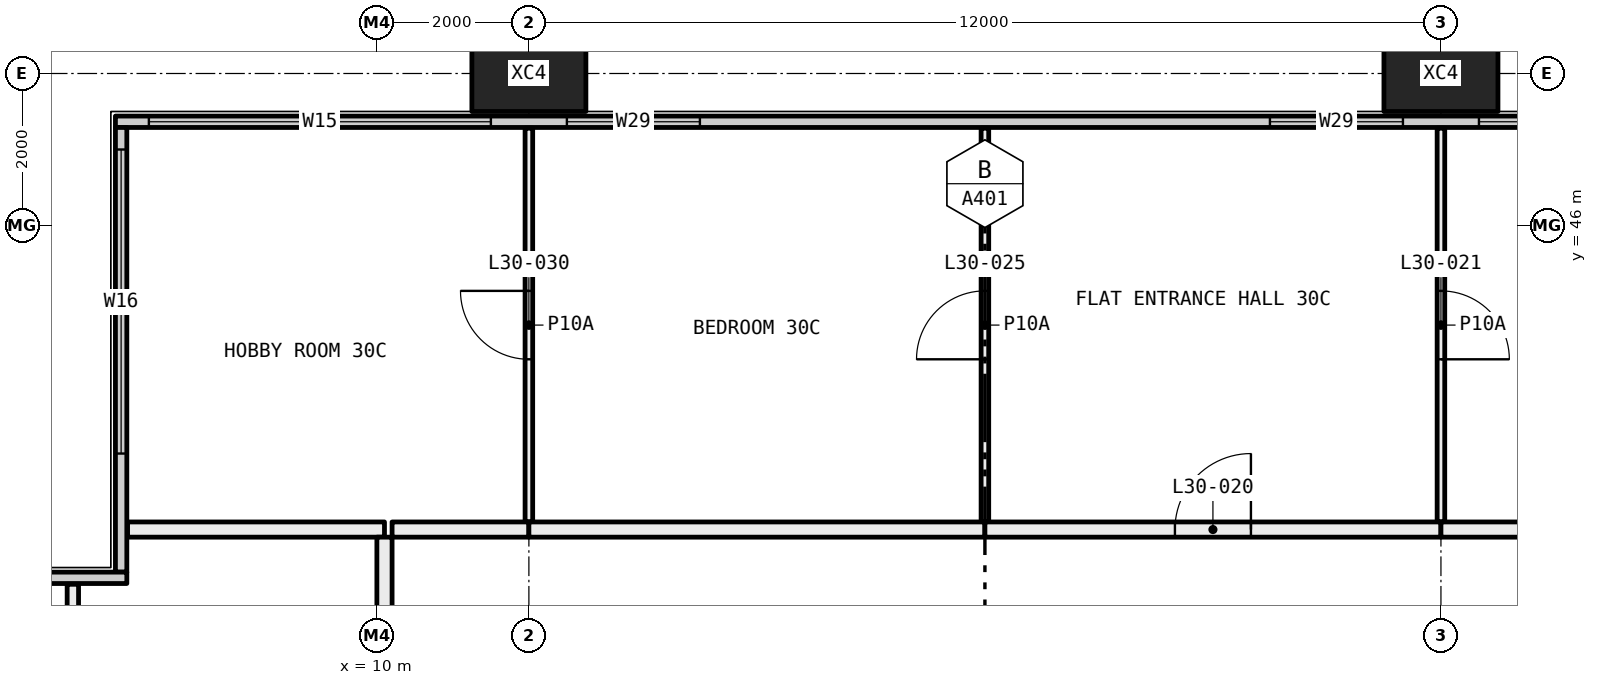
"""IFC4 building model, lengths in metres.
Left out: names, types, materials, properties, quantities, classifications, styles, units other than length and angle.
Written with IfcOpenShell. Run it as: python <this file> out.ifc"""

import sys

from ifc_helpers import new_model, si_unit, direction, frame, frame_2d, origin, origin_2d, place, context, subcontext, project, spatial, rectangle, hollow_rectangle, extrude, element, fill, save


model = new_model("IFC4")
c1 = context("Model", 3, precision=1e-05, world=origin(), true_north=direction((0.0, 1.0)))
c2 = subcontext(c1, "Body", "Model", "MODEL_VIEW")
j1 = project(units=[si_unit("LENGTHUNIT", "METRE"), si_unit("PLANEANGLEUNIT", "RADIAN")], contexts=[c1])
p1 = place(None, origin())
s1 = spatial("IfcSite", under=j1, at=p1, CompositionType="ELEMENT")
p2 = place(p1, origin())
s2 = spatial("IfcBuilding", under=s1, at=p2, CompositionType="ELEMENT")
p3 = place(p2, frame((0.0, 0.0, 117.3)))
s3 = spatial("IfcBuildingStorey", under=s2, at=p3, CompositionType="ELEMENT", Elevation=117.3)
for number, where, z_axis, x_axis in (
    (1, (12.0, 48.0, -0.4), (0.0, 0.0, 1.0), (1.0, 0.0, 0.0)),
    (2, (24.0, 48.0, -0.4), (0.0, 0.0, 1.0), (1.0, 0.0, 0.0)),
):
    element("IfcColumn", number, at=place(p3, frame(where, z_axis=z_axis, x_axis=x_axis)), inside=s3, PredefinedType="COLUMN", context=c2, shape_type="SweptSolid", body=[
        extrude(hollow_rectangle(XDim=1.5, YDim=1.0, WallThickness=0.06, at=origin_2d()), origin(), (0.0, 0.0, 1.0), 3.45),
    ])
p4 = place(p3, frame((6.56, 47.365, 0.0), z_axis=(0.0, 0.0, 1.0), x_axis=(1.0, 0.0, 0.0)))
e3 = element("IfcWall", 3, at=p4, inside=s3, PredefinedType="ELEMENTEDWALL", context=c2, shape_type="SweptSolid", body=[
    extrude(rectangle(XDim=58.88, YDim=0.15, at=frame_2d((29.44, 0.0))), origin(), (0.0, 0.0, 1.0), 3.05),
])
p5 = place(p4, frame((0.44, 0.0, 0.45)))
e4 = element("IfcOpeningElement", 4, at=p5, cuts=e3, PredefinedType="OPENING", context=c2, shape_type="SweptSolid", body=[
    extrude(rectangle(XDim=4.5, YDim=2.55, at=frame_2d((2.25, 1.275))), frame((0.0, 0.085, 0.0), z_axis=(0.0, -1.0, 0.0), x_axis=(1.0, 0.0, 0.0)), (0.0, 0.0, 1.0), 0.17),
])
p6 = place(p4, frame((5.94, 0.0, 0.45)))
e5 = element("IfcOpeningElement", 5, at=p6, cuts=e3, PredefinedType="OPENING", context=c2, shape_type="SweptSolid", body=[
    extrude(rectangle(XDim=1.75, YDim=2.55, at=frame_2d((0.875, 1.275))), frame((0.0, 0.085, 0.0), z_axis=(0.0, -1.0, 0.0), x_axis=(1.0, 0.0, 0.0)), (0.0, 0.0, 1.0), 0.17),
])
p7 = place(p4, frame((15.19, 0.0, 0.45)))
e6 = element("IfcOpeningElement", 6, at=p7, cuts=e3, PredefinedType="OPENING", context=c2, shape_type="SweptSolid", body=[
    extrude(rectangle(XDim=1.75, YDim=2.55, at=frame_2d((0.875, 1.275))), frame((0.0, 0.085, 0.0), z_axis=(0.0, -1.0, 0.0), x_axis=(1.0, 0.0, 0.0)), (0.0, 0.0, 1.0), 0.17),
])
p8 = place(p4, frame((17.94, 0.0, 0.45)))
e7 = element("IfcOpeningElement", 7, at=p8, cuts=e3, PredefinedType="OPENING", context=c2, shape_type="SweptSolid", body=[
    extrude(rectangle(XDim=1.75, YDim=2.55, at=frame_2d((0.875, 1.275))), frame((0.0, 0.085, 0.0), z_axis=(0.0, -1.0, 0.0), x_axis=(1.0, 0.0, 0.0)), (0.0, 0.0, 1.0), 0.17),
])
p9 = place(p4, frame((27.19, 0.0, 0.45)))
e8 = element("IfcOpeningElement", 8, at=p9, cuts=e3, PredefinedType="OPENING", context=c2, shape_type="SweptSolid", body=[
    extrude(rectangle(XDim=1.75, YDim=2.55, at=frame_2d((0.875, 1.275))), frame((0.0, 0.085, 0.0), z_axis=(0.0, -1.0, 0.0), x_axis=(1.0, 0.0, 0.0)), (0.0, 0.0, 1.0), 0.17),
])
p10 = place(p4, frame((29.94, 0.0, 0.45)))
e9 = element("IfcOpeningElement", 9, at=p10, cuts=e3, PredefinedType="OPENING", context=c2, shape_type="SweptSolid", body=[
    extrude(rectangle(XDim=1.75, YDim=2.55, at=frame_2d((0.875, 1.275))), frame((0.0, 0.085, 0.0), z_axis=(0.0, -1.0, 0.0), x_axis=(1.0, 0.0, 0.0)), (0.0, 0.0, 1.0), 0.17),
])
p11 = place(p4, frame((39.19, 0.0, 0.45)))
e10 = element("IfcOpeningElement", 10, at=p11, cuts=e3, PredefinedType="OPENING", context=c2, shape_type="SweptSolid", body=[
    extrude(rectangle(XDim=1.75, YDim=2.55, at=frame_2d((0.875, 1.275))), frame((0.0, 0.085, 0.0), z_axis=(0.0, -1.0, 0.0), x_axis=(1.0, 0.0, 0.0)), (0.0, 0.0, 1.0), 0.17),
])
p12 = place(p4, frame((41.94, 0.0, 0.45)))
e11 = element("IfcOpeningElement", 11, at=p12, cuts=e3, PredefinedType="OPENING", context=c2, shape_type="SweptSolid", body=[
    extrude(rectangle(XDim=1.75, YDim=2.55, at=frame_2d((0.875, 1.275))), frame((0.0, 0.085, 0.0), z_axis=(0.0, -1.0, 0.0), x_axis=(1.0, 0.0, 0.0)), (0.0, 0.0, 1.0), 0.17),
])
p13 = place(p4, frame((51.19, 0.0, 0.45)))
e12 = element("IfcOpeningElement", 12, at=p13, cuts=e3, PredefinedType="OPENING", context=c2, shape_type="SweptSolid", body=[
    extrude(rectangle(XDim=1.75, YDim=2.55, at=frame_2d((0.875, 1.275))), frame((0.0, 0.085, 0.0), z_axis=(0.0, -1.0, 0.0), x_axis=(1.0, 0.0, 0.0)), (0.0, 0.0, 1.0), 0.17),
])
p14 = place(p4, frame((53.94, 0.0, 0.45)))
e13 = element("IfcOpeningElement", 13, at=p14, cuts=e3, PredefinedType="OPENING", context=c2, shape_type="SweptSolid", body=[
    extrude(rectangle(XDim=4.5, YDim=2.55, at=frame_2d((2.25, 1.275))), frame((0.0, 0.085, 0.0), z_axis=(0.0, -1.0, 0.0), x_axis=(1.0, 0.0, 0.0)), (0.0, 0.0, 1.0), 0.17),
])
p15 = place(p3, frame((6.635, 41.44, 0.0), z_axis=(0.0, 0.0, 1.0), x_axis=(0.0, 1.0, 0.0)))
e14 = element("IfcWall", 14, at=p15, inside=s3, PredefinedType="ELEMENTEDWALL", context=c2, shape_type="SweptSolid", body=[
    extrude(rectangle(XDim=5.85, YDim=0.15, at=frame_2d((2.925, 0.0))), origin(), (0.0, 0.0, 1.0), 3.05),
])
p16 = place(p15, frame((1.56, 0.0, 0.45)))
e15 = element("IfcOpeningElement", 15, at=p16, cuts=e14, PredefinedType="OPENING", context=c2, shape_type="SweptSolid", body=[
    extrude(rectangle(XDim=4.0, YDim=2.55, at=frame_2d((2.0, 1.275))), frame((0.0, 0.085, 0.0), z_axis=(0.0, -1.0, 0.0), x_axis=(1.0, 0.0, 0.0)), (0.0, 0.0, 1.0), 0.17),
])
p17 = place(p3, frame((0.56, 41.365, 0.0), z_axis=(0.0, 0.0, 1.0), x_axis=(1.0, 0.0, 0.0)))
e16 = element("IfcWall", 16, at=p17, inside=s3, PredefinedType="ELEMENTEDWALL", context=c2, shape_type="SweptSolid", body=[
    extrude(rectangle(XDim=6.15, YDim=0.15, at=frame_2d((3.075, 0.0))), origin(), (0.0, 0.0, 1.0), 3.05),
])
p18 = place(p17, frame((0.44, 0.0, 0.45)))
e17 = element("IfcOpeningElement", 17, at=p18, cuts=e16, PredefinedType="OPENING", context=c2, shape_type="SweptSolid", body=[
    extrude(rectangle(XDim=4.0, YDim=2.55, at=frame_2d((2.0, 1.275))), frame((0.0, 0.085, 0.0), z_axis=(0.0, -1.0, 0.0), x_axis=(1.0, 0.0, 0.0)), (0.0, 0.0, 1.0), 0.17),
])
p19 = place(p3, frame((6.0, 37.5, 0.0), z_axis=(0.0, 0.0, 1.0), x_axis=(0.0, 1.0, 0.0)))
e18 = element("IfcWall", 18, at=p19, inside=s3, PredefinedType="PARTITIONING", context=c2, shape_type="SweptSolid", body=[
    extrude(rectangle(XDim=3.78, YDim=0.15, at=frame_2d((1.89, 0.0))), origin(), (0.0, 0.0, 1.0), 3.05),
])
p20 = place(p3, frame((10.1, 42.0, 0.0), z_axis=(0.0, 0.0, 1.0), x_axis=(-1.0, 0.0, 0.0)))
e19 = element("IfcWall", 19, at=p20, inside=s3, PredefinedType="PARTITIONING", context=c2, shape_type="SweptSolid", body=[
    extrude(rectangle(XDim=3.38, YDim=0.2, at=frame_2d((1.69, 0.0))), origin(), (0.0, 0.0, 1.0), 3.05),
])
p21 = place(p3, frame((10.1, 37.5, 0.0), z_axis=(0.0, 0.0, 1.0), x_axis=(0.0, 1.0, 0.0)))
e20 = element("IfcWall", 20, at=p21, inside=s3, PredefinedType="PARTITIONING", context=c2, shape_type="SweptSolid", body=[
    extrude(rectangle(XDim=4.4, YDim=0.2, at=frame_2d((2.2, 0.0))), origin(), (0.0, 0.0, 1.0), 3.05),
])
p22 = place(p3, frame((12.0, 42.1, 0.0), z_axis=(0.0, 0.0, 1.0), x_axis=(0.0, 1.0, 0.0)))
e21 = element("IfcWall", 21, at=p22, inside=s3, PredefinedType="PARTITIONING", context=c2, shape_type="SweptSolid", body=[
    extrude(rectangle(XDim=5.18, YDim=0.1, at=frame_2d((2.59, 0.0))), origin(), (0.0, 0.0, 1.0), 3.05),
])
p23 = place(p22, frame((2.14, 0.0, 0.0)))
e22 = element("IfcOpeningElement", 22, at=p23, cuts=e21, PredefinedType="OPENING", context=c2, shape_type="SweptSolid", body=[
    extrude(rectangle(XDim=0.9, YDim=2.1, at=frame_2d((0.45, 1.05))), frame((0.0, 0.06, 0.0), z_axis=(0.0, -1.0, 0.0), x_axis=(1.0, 0.0, 0.0)), (0.0, 0.0, 1.0), 0.12),
])
p24 = place(p3, frame((10.2, 42.0, 0.0), z_axis=(0.0, 0.0, 1.0), x_axis=(1.0, 0.0, 0.0)))
e23 = element("IfcWall", 23, at=p24, inside=s3, PredefinedType="PARTITIONING", context=c2, shape_type="SweptSolid", body=[
    extrude(rectangle(XDim=1.8, YDim=0.2, at=frame_2d((0.9, 0.0))), origin(), (0.0, 0.0, 1.0), 3.05),
])
p25 = place(p3, frame((18.0, 42.1, 0.0), z_axis=(0.0, 0.0, 1.0), x_axis=(0.0, 1.0, 0.0)))
e24 = element("IfcWall", 24, at=p25, inside=s3, PredefinedType="PARTITIONING", context=c2, shape_type="SweptSolid", body=[
    extrude(rectangle(XDim=5.18, YDim=0.1, at=frame_2d((2.59, 0.0))), origin(), (0.0, 0.0, 1.0), 3.05),
])
p26 = place(p25, frame((2.14, 0.0, 0.0)))
e25 = element("IfcOpeningElement", 25, at=p26, cuts=e24, PredefinedType="OPENING", context=c2, shape_type="SweptSolid", body=[
    extrude(rectangle(XDim=0.9, YDim=2.1, at=frame_2d((0.45, 1.05))), frame((0.0, 0.06, 0.0), z_axis=(0.0, -1.0, 0.0), x_axis=(1.0, 0.0, 0.0)), (0.0, 0.0, 1.0), 0.12),
])
p27 = place(p3, frame((12.0, 42.0, 0.0), z_axis=(0.0, 0.0, 1.0), x_axis=(1.0, 0.0, 0.0)))
e26 = element("IfcWall", 26, at=p27, inside=s3, PredefinedType="PARTITIONING", context=c2, shape_type="SweptSolid", body=[
    extrude(rectangle(XDim=6.0, YDim=0.2, at=frame_2d((3.0, 0.0))), origin(), (0.0, 0.0, 1.0), 3.05),
])
p28 = place(p3, frame((24.0, 42.1, 0.0), z_axis=(0.0, 0.0, 1.0), x_axis=(0.0, 1.0, 0.0)))
e27 = element("IfcWall", 27, at=p28, inside=s3, PredefinedType="PARTITIONING", context=c2, shape_type="SweptSolid", body=[
    extrude(rectangle(XDim=5.18, YDim=0.1, at=frame_2d((2.59, 0.0))), origin(), (0.0, 0.0, 1.0), 3.05),
])
p29 = place(p28, frame((2.14, 0.0, 0.0)))
e28 = element("IfcOpeningElement", 28, at=p29, cuts=e27, PredefinedType="OPENING", context=c2, shape_type="SweptSolid", body=[
    extrude(rectangle(XDim=0.9, YDim=2.1, at=frame_2d((0.45, 1.05))), frame((0.0, 0.06, 0.0), z_axis=(0.0, -1.0, 0.0), x_axis=(1.0, 0.0, 0.0)), (0.0, 0.0, 1.0), 0.12),
])
p30 = place(p3, frame((18.0, 42.0, 0.0), z_axis=(0.0, 0.0, 1.0), x_axis=(1.0, 0.0, 0.0)))
e29 = element("IfcWall", 29, at=p30, inside=s3, PredefinedType="PARTITIONING", context=c2, shape_type="SweptSolid", body=[
    extrude(rectangle(XDim=6.0, YDim=0.2, at=frame_2d((3.0, 0.0))), origin(), (0.0, 0.0, 1.0), 3.05),
])
p31 = place(p30, frame((2.5, 0.0, 0.0)))
e30 = element("IfcOpeningElement", 30, at=p31, cuts=e29, PredefinedType="OPENING", context=c2, shape_type="SweptSolid", body=[
    extrude(rectangle(XDim=1.0, YDim=2.1, at=frame_2d((0.5, 1.05))), frame((0.0, 0.11, 0.0), z_axis=(0.0, -1.0, 0.0), x_axis=(1.0, 0.0, 0.0)), (0.0, 0.0, 1.0), 0.22),
])
p32 = place(p3, frame((24.0, 42.0, 0.0), z_axis=(0.0, 0.0, 1.0), x_axis=(1.0, 0.0, 0.0)))
e31 = element("IfcWall", 31, at=p32, inside=s3, PredefinedType="PARTITIONING", context=c2, shape_type="SweptSolid", body=[
    extrude(rectangle(XDim=1.9, YDim=0.2, at=frame_2d((0.95, 0.0))), origin(), (0.0, 0.0, 1.0), 3.05),
])
p33 = place(p5, origin())
e32 = element("IfcWindow", 32, at=p33, inside=s3, PartitioningType="SINGLE_PANEL", PredefinedType="WINDOW", context=c2, shape_type="SweptSolid", body=[
    extrude(rectangle(XDim=4.5, YDim=2.55, at=frame_2d((2.25, 1.275))), frame((0.0, 0.03, 0.0), z_axis=(0.0, -1.0, 0.0), x_axis=(1.0, 0.0, 0.0)), (0.0, 0.0, 1.0), 0.06),
])
fill(e4, e32)
p34 = place(p6, origin())
e33 = element("IfcWindow", 33, at=p34, inside=s3, PartitioningType="SINGLE_PANEL", PredefinedType="WINDOW", context=c2, shape_type="SweptSolid", body=[
    extrude(rectangle(XDim=1.75, YDim=2.55, at=frame_2d((0.875, 1.275))), frame((0.0, 0.03, 0.0), z_axis=(0.0, -1.0, 0.0), x_axis=(1.0, 0.0, 0.0)), (0.0, 0.0, 1.0), 0.06),
])
fill(e5, e33)
p35 = place(p7, origin())
e34 = element("IfcWindow", 34, at=p35, inside=s3, PartitioningType="SINGLE_PANEL", PredefinedType="WINDOW", context=c2, shape_type="SweptSolid", body=[
    extrude(rectangle(XDim=1.75, YDim=2.55, at=frame_2d((0.875, 1.275))), frame((0.0, 0.03, 0.0), z_axis=(0.0, -1.0, 0.0), x_axis=(1.0, 0.0, 0.0)), (0.0, 0.0, 1.0), 0.06),
])
fill(e6, e34)
p36 = place(p8, origin())
e35 = element("IfcWindow", 35, at=p36, inside=s3, PartitioningType="SINGLE_PANEL", PredefinedType="WINDOW", context=c2, shape_type="SweptSolid", body=[
    extrude(rectangle(XDim=1.75, YDim=2.55, at=frame_2d((0.875, 1.275))), frame((0.0, 0.03, 0.0), z_axis=(0.0, -1.0, 0.0), x_axis=(1.0, 0.0, 0.0)), (0.0, 0.0, 1.0), 0.06),
])
fill(e7, e35)
p37 = place(p16, origin())
e36 = element("IfcWindow", 36, at=p37, inside=s3, PartitioningType="SINGLE_PANEL", PredefinedType="WINDOW", context=c2, shape_type="SweptSolid", body=[
    extrude(rectangle(XDim=4.0, YDim=2.55, at=frame_2d((2.0, 1.275))), frame((0.0, 0.03, 0.0), z_axis=(0.0, -1.0, 0.0), x_axis=(1.0, 0.0, 0.0)), (0.0, 0.0, 1.0), 0.06),
])
fill(e15, e36)
p38 = place(p31, origin())
e37 = element("IfcDoor", 37, at=p38, inside=s3, OperationType="SINGLE_SWING_LEFT", PredefinedType="DOOR", context=c2, shape_type="SweptSolid", body=[
    extrude(rectangle(XDim=1.0, YDim=2.1, at=frame_2d((0.5, 1.05))), frame((0.0, 0.025, 0.0), z_axis=(0.0, -1.0, 0.0), x_axis=(1.0, 0.0, 0.0)), (0.0, 0.0, 1.0), 0.05),
])
fill(e30, e37)
p39 = place(p29, frame((0.9, 0.0, 0.0), x_axis=(-1.0, 0.0, 0.0)))
e38 = element("IfcDoor", 38, at=p39, inside=s3, OperationType="SINGLE_SWING_LEFT", PredefinedType="DOOR", context=c2, shape_type="SweptSolid", body=[
    extrude(rectangle(XDim=0.9, YDim=2.1, at=frame_2d((0.45, 1.05))), frame((0.0, 0.025, 0.0), z_axis=(0.0, -1.0, 0.0), x_axis=(1.0, 0.0, 0.0)), (0.0, 0.0, 1.0), 0.05),
])
fill(e28, e38)
p40 = place(p26, origin())
e39 = element("IfcDoor", 39, at=p40, inside=s3, OperationType="SINGLE_SWING_RIGHT", PredefinedType="DOOR", context=c2, shape_type="SweptSolid", body=[
    extrude(rectangle(XDim=0.9, YDim=2.1, at=frame_2d((0.45, 1.05))), frame((0.0, 0.025, 0.0), z_axis=(0.0, -1.0, 0.0), x_axis=(1.0, 0.0, 0.0)), (0.0, 0.0, 1.0), 0.05),
])
fill(e25, e39)
p41 = place(p23, origin())
e40 = element("IfcDoor", 40, at=p41, inside=s3, OperationType="SINGLE_SWING_LEFT", PredefinedType="DOOR", context=c2, shape_type="SweptSolid", body=[
    extrude(rectangle(XDim=0.9, YDim=2.1, at=frame_2d((0.45, 1.05))), frame((0.0, 0.025, 0.0), z_axis=(0.0, -1.0, 0.0), x_axis=(1.0, 0.0, 0.0)), (0.0, 0.0, 1.0), 0.05),
])
fill(e22, e40)
save(model, sys.argv[1])
